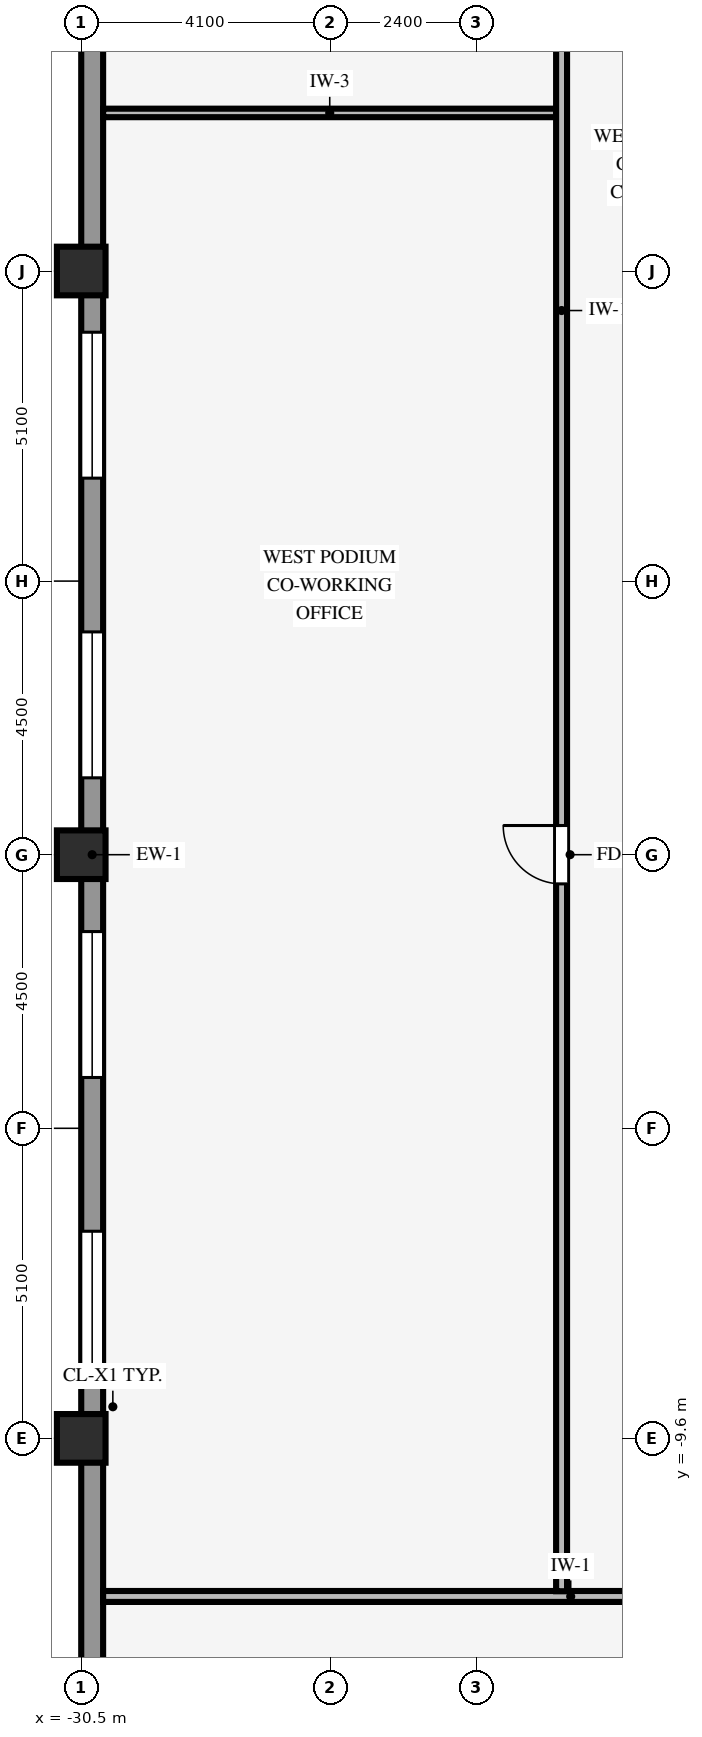
"""IFC4 building model, lengths in metres.
Left out: names, types, materials, properties, quantities, classifications, styles, units other than length and angle.
Written with IfcOpenShell. Run it as: python <this file> out.ifc"""

import sys

from ifc_helpers import new_model, si_unit, direction, frame, frame_2d, origin, origin_2d, place, context, subcontext, project, spatial, rectangle, hollow_rectangle, extrude, source, transform, mapped, element, fill, save


model = new_model("IFC4")
c1 = context("Model", 3, precision=1e-05, world=origin(), true_north=direction((0.0, 1.0)))
c2 = subcontext(c1, "Body", "Model", "MODEL_VIEW")
j1 = project(units=[si_unit("LENGTHUNIT", "METRE"), si_unit("PLANEANGLEUNIT", "RADIAN")], contexts=[c1])
p1 = place(None, origin())
s1 = spatial("IfcSite", under=j1, at=p1, CompositionType="ELEMENT")
p2 = place(p1, origin())
s2 = spatial("IfcBuilding", under=s1, at=p2, CompositionType="ELEMENT")
p3 = place(p2, frame((0.0, 0.0, 9.2)))
s3 = spatial("IfcBuildingStorey", under=s2, at=p3, CompositionType="ELEMENT", Elevation=9.2)
for number, where, z_axis, x_axis in (
    (1, (-30.5, -9.6, 0.0), (0.0, 0.0, 1.0), (1.0, 0.0, 0.0)),
    (2, (-30.5, 0.0, 0.0), (0.0, 0.0, 1.0), (1.0, 0.0, 0.0)),
    (3, (-30.5, 9.6, 0.0), (0.0, 0.0, 1.0), (1.0, 0.0, 0.0)),
):
    element("IfcColumn", number, at=place(p3, frame(where, z_axis=z_axis, x_axis=x_axis)), inside=s3, PredefinedType="COLUMN", context=c2, shape_type="SweptSolid", body=[
        extrude(hollow_rectangle(XDim=0.8, YDim=0.8, WallThickness=0.055, InnerFilletRadius=0.055, OuterFilletRadius=0.11, at=origin_2d()), origin(), (0.0, 0.0, 1.0), 4.28),
    ])
p4 = place(p3, frame((-30.32, -25.644, 0.0), z_axis=(0.0, 0.0, 1.0), x_axis=(0.0, 1.0, 0.0)))
e4 = element("IfcWall", 4, at=p4, inside=s3, PredefinedType="STANDARD", context=c2, shape_type="SweptSolid", body=[
    extrude(rectangle(XDim=51.288, YDim=0.36, at=frame_2d((25.644, 0.0))), origin(), (0.0, 0.0, 1.0), 3.615),
])
p5 = place(p4, frame((2.264, 0.0, 0.85)))
e5 = element("IfcOpeningElement", 5, at=p5, cuts=e4, PredefinedType="OPENING", context=c2, shape_type="SweptSolid", body=[
    extrude(rectangle(XDim=2.4, YDim=2.45, at=frame_2d((1.2, 1.225))), frame((0.0, 0.19, 0.0), z_axis=(0.0, -1.0, 0.0), x_axis=(1.0, 0.0, 0.0)), (0.0, 0.0, 1.0), 0.38),
])
p6 = place(p4, frame((17.051, 0.0, 0.85)))
e6 = element("IfcOpeningElement", 6, at=p6, cuts=e4, PredefinedType="OPENING", context=c2, shape_type="SweptSolid", body=[
    extrude(rectangle(XDim=2.4, YDim=2.45, at=frame_2d((1.2, 1.225))), frame((0.0, 0.19, 0.0), z_axis=(0.0, -1.0, 0.0), x_axis=(1.0, 0.0, 0.0)), (0.0, 0.0, 1.0), 0.38),
])
p7 = place(p4, frame((21.979, 0.0, 0.85)))
e7 = element("IfcOpeningElement", 7, at=p7, cuts=e4, PredefinedType="OPENING", context=c2, shape_type="SweptSolid", body=[
    extrude(rectangle(XDim=2.4, YDim=2.45, at=frame_2d((1.2, 1.225))), frame((0.0, 0.19, 0.0), z_axis=(0.0, -1.0, 0.0), x_axis=(1.0, 0.0, 0.0)), (0.0, 0.0, 1.0), 0.38),
])
p8 = place(p4, frame((26.908, 0.0, 0.85)))
e8 = element("IfcOpeningElement", 8, at=p8, cuts=e4, PredefinedType="OPENING", context=c2, shape_type="SweptSolid", body=[
    extrude(rectangle(XDim=2.4, YDim=2.45, at=frame_2d((1.2, 1.225))), frame((0.0, 0.19, 0.0), z_axis=(0.0, -1.0, 0.0), x_axis=(1.0, 0.0, 0.0)), (0.0, 0.0, 1.0), 0.38),
])
p9 = place(p4, frame((31.837, 0.0, 0.85)))
e9 = element("IfcOpeningElement", 9, at=p9, cuts=e4, PredefinedType="OPENING", context=c2, shape_type="SweptSolid", body=[
    extrude(rectangle(XDim=2.4, YDim=2.45, at=frame_2d((1.2, 1.225))), frame((0.0, 0.19, 0.0), z_axis=(0.0, -1.0, 0.0), x_axis=(1.0, 0.0, 0.0)), (0.0, 0.0, 1.0), 0.38),
])
p10 = place(p4, frame((46.624, 0.0, 0.85)))
e10 = element("IfcOpeningElement", 10, at=p10, cuts=e4, PredefinedType="OPENING", context=c2, shape_type="SweptSolid", body=[
    extrude(rectangle(XDim=2.4, YDim=2.45, at=frame_2d((1.2, 1.225))), frame((0.0, 0.19, 0.0), z_axis=(0.0, -1.0, 0.0), x_axis=(1.0, 0.0, 0.0)), (0.0, 0.0, 1.0), 0.38),
])
p11 = place(p3, frame((-30.14, -12.2, 0.0), z_axis=(0.0, 0.0, 1.0), x_axis=(1.0, 0.0, 0.0)))
e11 = element("IfcWall", 11, at=p11, inside=s3, PredefinedType="PARTITIONING", context=c2, shape_type="SweptSolid", body=[
    extrude(rectangle(XDim=22.28, YDim=0.18, at=frame_2d((11.14, 0.0))), origin(), (0.0, 0.0, 1.0), 4.27),
])
p12 = place(p11, frame((15.83, 0.0, 0.0)))
e12 = element("IfcOpeningElement", 12, at=p12, cuts=e11, PredefinedType="OPENING", context=c2, shape_type="SweptSolid", body=[
    extrude(rectangle(XDim=0.96, YDim=2.1, at=frame_2d((0.48, 1.05))), frame((0.0, 0.1, 0.0), z_axis=(0.0, -1.0, 0.0), x_axis=(1.0, 0.0, 0.0)), (0.0, 0.0, 1.0), 0.2),
])
p13 = place(p3, frame((-30.14, 12.2, 0.0), z_axis=(0.0, 0.0, 1.0), x_axis=(1.0, 0.0, 0.0)))
e13 = element("IfcWall", 13, at=p13, inside=s3, PredefinedType="PARTITIONING", context=c2, shape_type="SweptSolid", body=[
    extrude(rectangle(XDim=7.454, YDim=0.14, at=frame_2d((3.727, 0.0))), origin(), (0.0, 0.0, 1.0), 4.27),
])
p14 = place(p3, frame((-22.6, -12.114, 0.0), z_axis=(0.0, 0.0, 1.0), x_axis=(0.0, 1.0, 0.0)))
e14 = element("IfcWall", 14, at=p14, inside=s3, PredefinedType="PARTITIONING", context=c2, shape_type="SweptSolid", body=[
    extrude(rectangle(XDim=37.919, YDim=0.18, at=frame_2d((18.959, 0.0))), origin(), (0.0, 0.0, 1.0), 4.27),
])
p15 = place(p14, frame((11.634, 0.0, 0.0)))
e15 = element("IfcOpeningElement", 15, at=p15, cuts=e14, PredefinedType="OPENING", context=c2, shape_type="SweptSolid", body=[
    extrude(rectangle(XDim=0.96, YDim=2.1, at=frame_2d((0.48, 1.05))), frame((0.0, 0.1, 0.0), z_axis=(0.0, -1.0, 0.0), x_axis=(1.0, 0.0, 0.0)), (0.0, 0.0, 1.0), 0.2),
])
p16 = place(p14, frame((29.534, 0.0, 0.0)))
e16 = element("IfcOpeningElement", 16, at=p16, cuts=e14, PredefinedType="OPENING", context=c2, shape_type="SweptSolid", body=[
    extrude(rectangle(XDim=0.96, YDim=2.1, at=frame_2d((0.48, 1.05))), frame((0.0, 0.1, 0.0), z_axis=(0.0, -1.0, 0.0), x_axis=(1.0, 0.0, 0.0)), (0.0, 0.0, 1.0), 0.2),
])
m1 = source(origin(), c2, "Body", "SweptSolid", [
    extrude(rectangle(XDim=2.4, YDim=2.45, at=frame_2d((1.2, 1.225))), frame((0.0, 0.03, 0.0), z_axis=(0.0, -1.0, 0.0), x_axis=(1.0, 0.0, 0.0)), (0.0, 0.0, 1.0), 0.06),
])
p17 = place(p6, origin())
e17 = element("IfcWindow", 17, at=p17, inside=s3, PartitioningType="SINGLE_PANEL", PredefinedType="WINDOW", context=c2, shape_type="MappedRepresentation", body=[
    mapped(m1, transform((0.0, 0.0, 0.0), scale=1.0)),
])
fill(e6, e17)
p18 = place(p7, origin())
e18 = element("IfcWindow", 18, at=p18, inside=s3, PartitioningType="SINGLE_PANEL", PredefinedType="WINDOW", context=c2, shape_type="MappedRepresentation", body=[
    mapped(m1, transform((0.0, 0.0, 0.0), scale=1.0)),
])
fill(e7, e18)
p19 = place(p8, origin())
e19 = element("IfcWindow", 19, at=p19, inside=s3, PartitioningType="SINGLE_PANEL", PredefinedType="WINDOW", context=c2, shape_type="MappedRepresentation", body=[
    mapped(m1, transform((0.0, 0.0, 0.0), scale=1.0)),
])
fill(e8, e19)
p20 = place(p9, origin())
e20 = element("IfcWindow", 20, at=p20, inside=s3, PartitioningType="SINGLE_PANEL", PredefinedType="WINDOW", context=c2, shape_type="MappedRepresentation", body=[
    mapped(m1, transform((0.0, 0.0, 0.0), scale=1.0)),
])
fill(e9, e20)
m2 = source(origin(), c2, "Body", "SweptSolid", [
    extrude(rectangle(XDim=0.96, YDim=2.1, at=frame_2d((0.48, 1.05))), frame((0.0, 0.025, 0.0), z_axis=(0.0, -1.0, 0.0), x_axis=(1.0, 0.0, 0.0)), (0.0, 0.0, 1.0), 0.05),
])
p21 = place(p15, origin())
e21 = element("IfcDoor", 21, at=p21, inside=s3, OperationType="SINGLE_SWING_RIGHT", PredefinedType="DOOR", context=c2, shape_type="MappedRepresentation", body=[
    mapped(m2, transform((0.0, 0.0, 0.0), scale=1.0)),
])
fill(e15, e21)
save(model, sys.argv[1])
